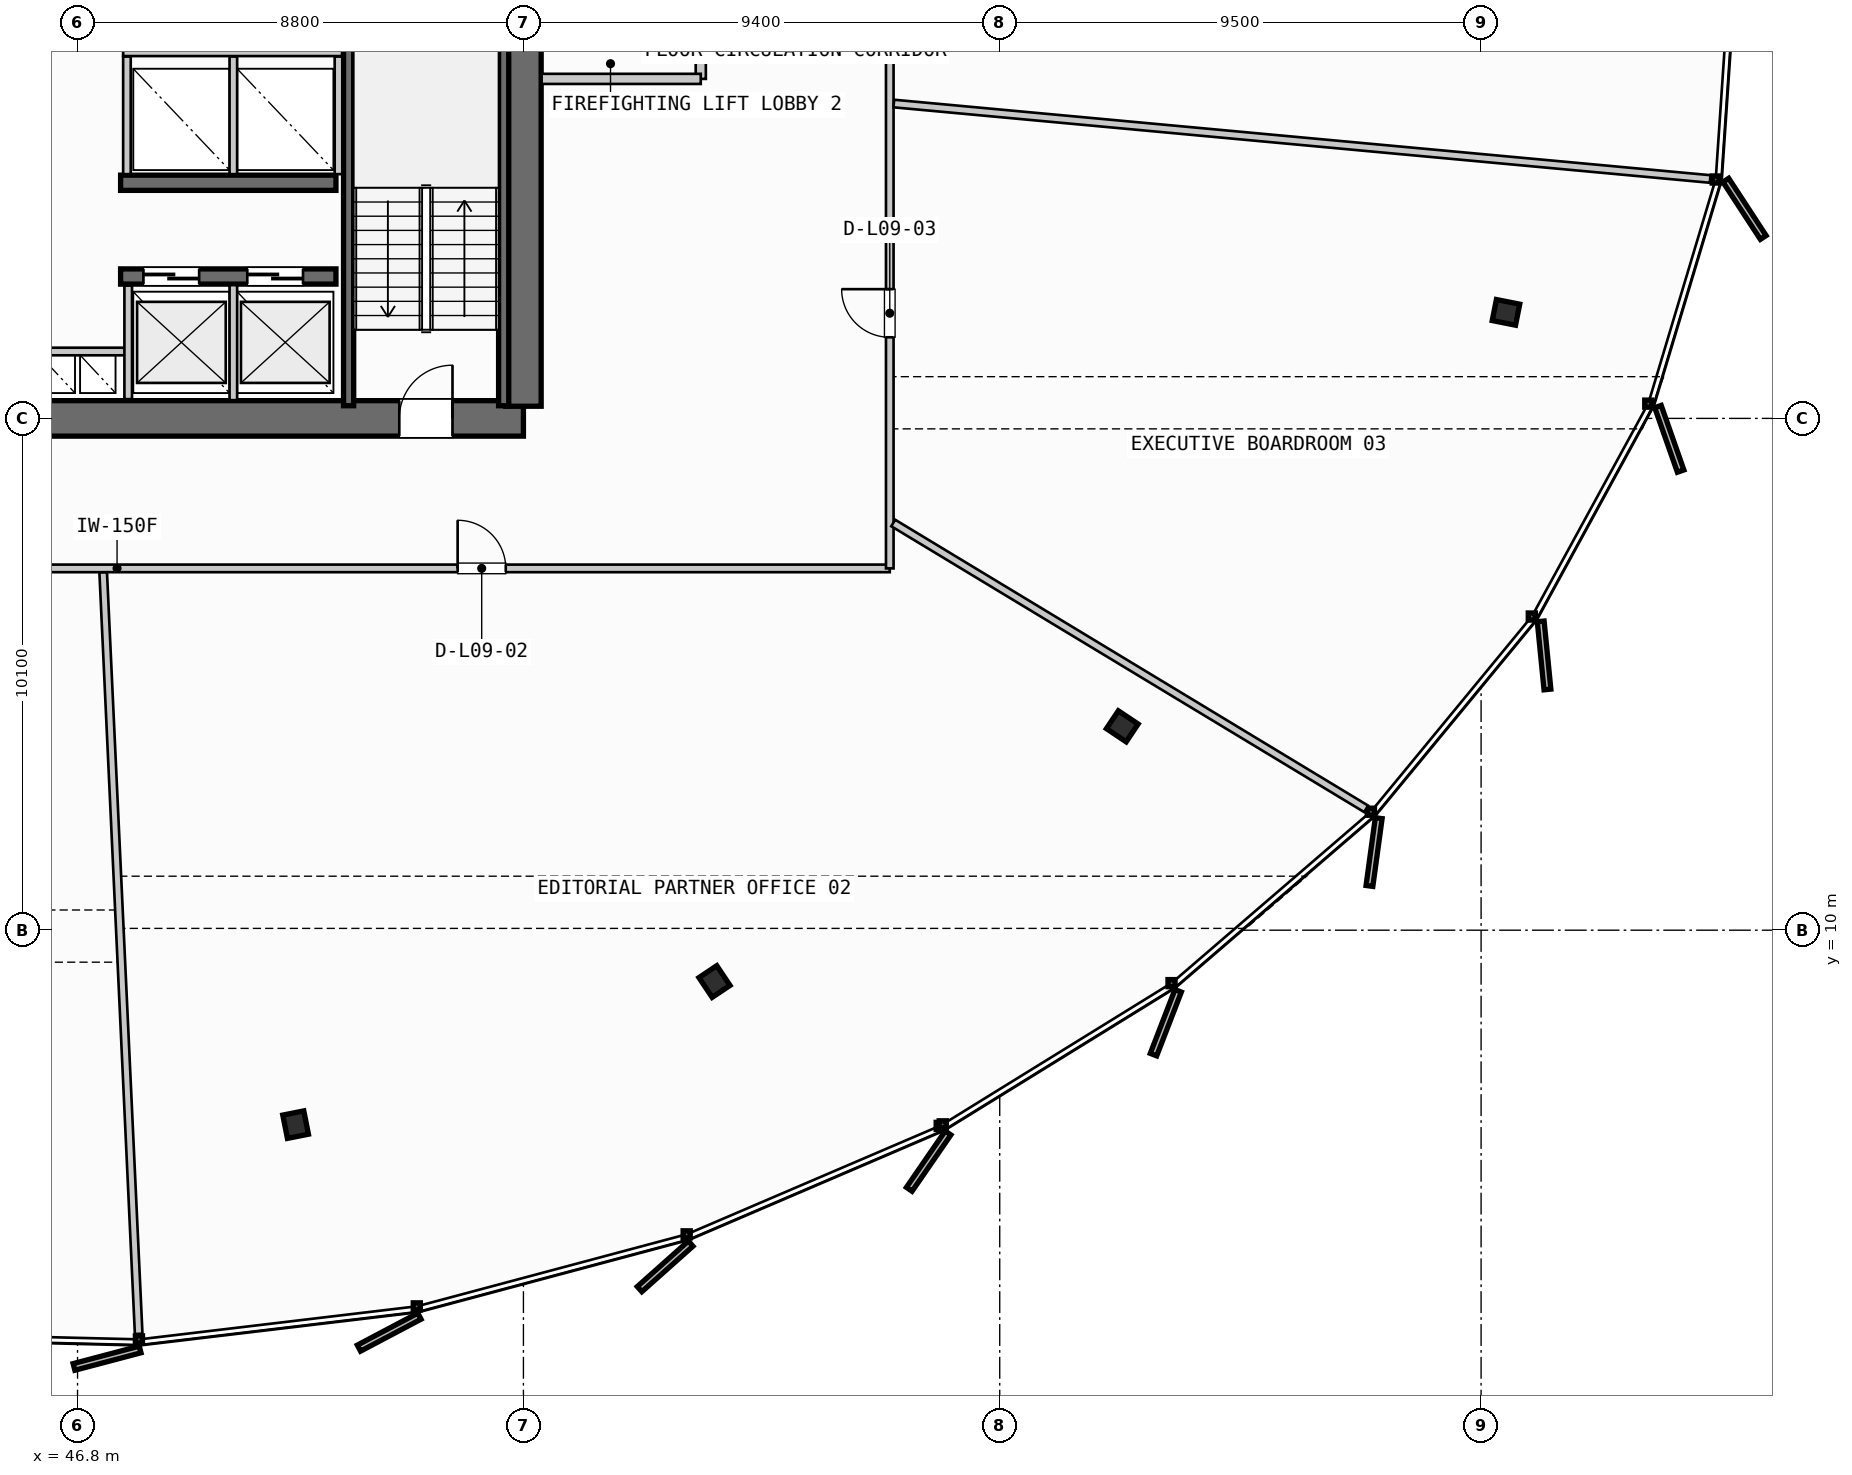
"""IFC4 building model, lengths in metres.
Left out: names, types, materials, properties, quantities, classifications, styles, units other than length and angle.
Written with IfcOpenShell. Run it as: python <this file> out.ifc"""

import sys

from ifc_helpers import new_model, si_unit, direction, frame, frame_2d, origin, origin_2d, place, context, subcontext, project, spatial, rectangle, i_section, extrude, source, transform, mapped, element, fill, save


model = new_model("IFC4")
c1 = context("Model", 3, precision=1e-05, world=origin(), true_north=direction((0.0, 1.0)))
c2 = subcontext(c1, "Body", "Model", "MODEL_VIEW")
j1 = project(units=[si_unit("LENGTHUNIT", "METRE"), si_unit("PLANEANGLEUNIT", "RADIAN")], contexts=[c1])
p1 = place(None, origin())
s1 = spatial("IfcSite", under=j1, at=p1, CompositionType="ELEMENT")
p2 = place(p1, origin())
s2 = spatial("IfcBuilding", under=s1, at=p2, CompositionType="ELEMENT")
p3 = place(p2, frame((0.0, 0.0, 41.0)))
s3 = spatial("IfcBuildingStorey", under=s2, at=p3, CompositionType="ELEMENT", Elevation=41.0)
p4 = place(p3, frame((38.0, 20.1, 0.0), z_axis=(0.0, 0.0, 1.0), x_axis=(1.0, 0.0, 0.0)))
e1 = element("IfcWall", 1, at=p4, inside=s3, PredefinedType="SHEAR", context=c2, shape_type="SweptSolid", body=[
    extrude(rectangle(XDim=17.6, YDim=0.7, at=frame_2d((8.8, 0.0))), origin(), (0.0, 0.0, 1.0), 3.55),
])
p5 = place(p4, frame((1.4, 0.0, 0.0)))
e2 = element("IfcOpeningElement", 2, at=p5, cuts=e1, PredefinedType="OPENING", context=c2, shape_type="SweptSolid", body=[
    extrude(rectangle(XDim=1.05, YDim=2.15, at=frame_2d((0.525, 1.075))), frame((0.0, 0.36, 0.0), z_axis=(0.0, -1.0, 0.0), x_axis=(1.0, 0.0, 0.0)), (0.0, 0.0, 1.0), 0.72),
])
p6 = place(p4, frame((15.15, 0.0, 0.0)))
e3 = element("IfcOpeningElement", 3, at=p6, cuts=e1, PredefinedType="OPENING", context=c2, shape_type="SweptSolid", body=[
    extrude(rectangle(XDim=1.05, YDim=2.15, at=frame_2d((0.525, 1.075))), frame((0.0, 0.36, 0.0), z_axis=(0.0, -1.0, 0.0), x_axis=(1.0, 0.0, 0.0)), (0.0, 0.0, 1.0), 0.72),
])
p7 = place(p3, frame((55.6, 20.34, 0.0), z_axis=(0.0, 0.0, 1.0), x_axis=(0.0, 1.0, 0.0)))
e4 = element("IfcWall", 4, at=p7, inside=s3, PredefinedType="SHEAR", context=c2, shape_type="SweptSolid", body=[
    extrude(rectangle(XDim=14.92, YDim=0.7, at=frame_2d((7.46, 0.0))), origin(), (0.0, 0.0, 1.0), 3.55),
])
p8 = place(p7, frame((12.71, 0.0, 0.0)))
e5 = element("IfcOpeningElement", 5, at=p8, cuts=e4, PredefinedType="OPENING", context=c2, shape_type="SweptSolid", body=[
    extrude(rectangle(XDim=1.05, YDim=2.15, at=frame_2d((0.525, 1.075))), frame((0.0, 0.36, 0.0), z_axis=(0.0, -1.0, 0.0), x_axis=(1.0, 0.0, 0.0)), (0.0, 0.0, 1.0), 0.72),
])
p9 = place(p7, frame((8.61, 0.0, 0.0)))
e6 = element("IfcOpeningElement", 6, at=p9, cuts=e4, PredefinedType="OPENING", context=c2, shape_type="SweptSolid", body=[
    extrude(rectangle(XDim=1.1, YDim=2.2, at=frame_2d((0.55, 1.1))), frame((0.0, 0.36, 0.0), z_axis=(0.0, -1.0, 0.0), x_axis=(1.0, 0.0, 0.0)), (0.0, 0.0, 1.0), 0.72),
])
p10 = place(p3, frame((47.65, 22.9, 0.0), z_axis=(0.0, 0.0, 1.0), x_axis=(1.0, 0.0, 0.0)))
e7 = element("IfcWall", 7, at=p10, inside=s3, PredefinedType="SHEAR", context=c2, shape_type="SweptSolid", body=[
    extrude(rectangle(XDim=4.25, YDim=0.3, at=frame_2d((2.125, 0.0))), origin(), (0.0, 0.0, 1.0), 3.55),
])
p11 = place(p10, frame((0.45, 0.0, 0.0)))
e8 = element("IfcOpeningElement", 8, at=p11, cuts=e7, PredefinedType="OPENING", context=c2, shape_type="SweptSolid", body=[
    extrude(rectangle(XDim=1.1, YDim=2.2, at=frame_2d((0.55, 1.1))), frame((0.0, 0.16, 0.0), z_axis=(0.0, -1.0, 0.0), x_axis=(1.0, 0.0, 0.0)), (0.0, 0.0, 1.0), 0.32),
])
p12 = place(p10, frame((2.5, 0.0, 0.0)))
e9 = element("IfcOpeningElement", 9, at=p12, cuts=e7, PredefinedType="OPENING", context=c2, shape_type="SweptSolid", body=[
    extrude(rectangle(XDim=1.1, YDim=2.2, at=frame_2d((0.55, 1.1))), frame((0.0, 0.16, 0.0), z_axis=(0.0, -1.0, 0.0), x_axis=(1.0, 0.0, 0.0)), (0.0, 0.0, 1.0), 0.32),
])
p13 = place(p3, frame((47.65, 24.75, 0.0), z_axis=(0.0, 0.0, 1.0), x_axis=(1.0, 0.0, 0.0)))
e10 = element("IfcWall", 10, at=p13, inside=s3, PredefinedType="SHEAR", context=c2, shape_type="SweptSolid", body=[
    extrude(rectangle(XDim=4.25, YDim=0.3, at=frame_2d((2.125, 0.0))), origin(), (0.0, 0.0, 1.0), 3.55),
])
m1 = source(origin(), c2, "Body", "SweptSolid", [
    extrude(i_section(OverallWidth=0.423, OverallDepth=0.469, WebThickness=0.051, FlangeThickness=0.081, FilletRadius=0.015, at=origin_2d()), origin(), (0.0, 0.0, 1.0), 3.55),
])
for number, where, z_axis, x_axis in (
    (11, (51.104, 6.163, 0.0), (0.0, 0.0, 1.0), (0.195, -0.981, 0.0)),
    (12, (59.37, 8.987, 0.0), (0.0, 0.0, 1.0), (0.556, -0.831, 0.0)),
    (13, (67.418, 14.023, 0.0), (0.0, 0.0, 1.0), (0.831, -0.556, 0.0)),
    (14, (74.991, 22.192, 0.0), (0.0, 0.0, 1.0), (0.981, -0.195, 0.0)),
):
    element("IfcColumn", number, at=place(p3, frame(where, z_axis=z_axis, x_axis=x_axis)), inside=s3, PredefinedType="COLUMN", context=c2, shape_type="MappedRepresentation", body=[
        mapped(m1, transform((0.0, 0.0, 0.0), scale=1.0)),
    ])
for number, where, z_axis, x_axis in (
    (15, (55.21, 27.7, 0.0), (0.0, 0.0, 1.0), (0.0, -1.0, 0.0)),
    (16, (52.15, 20.35, 0.0), (0.0, 0.0, 1.0), (0.0, 1.0, 0.0)),
):
    element("IfcWall", number, at=place(p3, frame(where, z_axis=z_axis, x_axis=x_axis)), inside=s3, PredefinedType="SHEAR", context=c2, shape_type="SweptSolid", body=[
        extrude(rectangle(XDim=7.35, YDim=0.2, at=frame_2d((3.675, 0.0))), origin(), (0.0, 0.0, 1.0), 3.55),
    ])
p14 = place(p3, frame((45.8, 21.42, 0.0), z_axis=(0.0, 0.0, 1.0), x_axis=(1.0, 0.0, 0.0)))
e17 = element("IfcWall", 17, at=p14, inside=s3, PredefinedType="PARTITIONING", context=c2, shape_type="SweptSolid", body=[
    extrude(rectangle(XDim=2.0, YDim=0.15, at=frame_2d((1.0, 0.0))), origin(), (0.0, 0.0, 1.0), 2.785),
])
p15 = place(p3, frame((47.8, 20.48, 0.0), z_axis=(0.0, 0.0, 1.0), x_axis=(0.0, 1.0, 0.0)))
e18 = element("IfcWall", 18, at=p15, inside=s3, PredefinedType="PARTITIONING", context=c2, shape_type="SweptSolid", body=[
    extrude(rectangle(XDim=2.24, YDim=0.15, at=frame_2d((1.12, 0.0))), origin(), (0.0, 0.0, 1.0), 2.785),
])
p16 = place(p3, frame((59.1, 26.8, 0.0), z_axis=(0.0, 0.0, 1.0), x_axis=(0.0, 1.0, 0.0)))
e19 = element("IfcWall", 19, at=p16, inside=s3, PredefinedType="PARTITIONING", context=c2, shape_type="SweptSolid", body=[
    extrude(rectangle(XDim=4.4, YDim=0.2, at=frame_2d((2.2, 0.0))), origin(), (0.0, 0.0, 1.0), 2.785),
])
p17 = place(p16, frame((1.65, 0.0, 0.0)))
e20 = element("IfcOpeningElement", 20, at=p17, cuts=e19, PredefinedType="OPENING", context=c2, shape_type="SweptSolid", body=[
    extrude(rectangle(XDim=1.05, YDim=2.15, at=frame_2d((0.525, 1.075))), frame((0.0, 0.11, 0.0), z_axis=(0.0, -1.0, 0.0), x_axis=(1.0, 0.0, 0.0)), (0.0, 0.0, 1.0), 0.22),
])
p18 = place(p3, frame((55.96, 26.8, 0.0), z_axis=(0.0, 0.0, 1.0), x_axis=(1.0, 0.0, 0.0)))
e21 = element("IfcWall", 21, at=p18, inside=s3, PredefinedType="PARTITIONING", context=c2, shape_type="SweptSolid", body=[
    extrude(rectangle(XDim=3.14, YDim=0.2, at=frame_2d((1.57, 0.0))), origin(), (0.0, 0.0, 1.0), 2.785),
])
p19 = place(p3, frame((49.875, 20.46, 0.0), z_axis=(0.0, 0.0, 1.0), x_axis=(0.0, 1.0, 0.0)))
e22 = element("IfcWall", 22, at=p19, inside=s3, PredefinedType="PARTITIONING", context=c2, shape_type="SweptSolid", body=[
    extrude(rectangle(XDim=2.27, YDim=0.15, at=frame_2d((1.135, 0.0))), origin(), (0.0, 0.0, 1.0), 2.785),
])
p20 = place(p3, frame((47.7, 27.325, 0.0), z_axis=(0.0, 0.0, 1.0), x_axis=(1.0, 0.0, 0.0)))
e23 = element("IfcWall", 23, at=p20, inside=s3, PredefinedType="PARTITIONING", context=c2, shape_type="SweptSolid", body=[
    extrude(rectangle(XDim=4.32, YDim=0.15, at=frame_2d((2.16, 0.0))), origin(), (0.0, 0.0, 1.0), 2.785),
])
for number, where, z_axis, x_axis in (
    (24, (47.775, 24.92, 0.0), (0.0, 0.0, 1.0), (0.0, 1.0, 0.0)),
    (25, (49.875, 24.92, 0.0), (0.0, 0.0, 1.0), (0.0, 1.0, 0.0)),
    (26, (51.95, 24.92, 0.0), (0.0, 0.0, 1.0), (0.0, 1.0, 0.0)),
):
    element("IfcWall", number, at=place(p3, frame(where, z_axis=z_axis, x_axis=x_axis)), inside=s3, PredefinedType="PARTITIONING", context=c2, shape_type="SweptSolid", body=[
        extrude(rectangle(XDim=2.32, YDim=0.15, at=frame_2d((1.16, 0.0))), origin(), (0.0, 0.0, 1.0), 2.785),
    ])
p21 = place(p3, frame((32.33, 17.14, 0.0), z_axis=(0.0, 0.0, 1.0), x_axis=(1.0, 0.0, 0.0)))
e27 = element("IfcWall", 27, at=p21, inside=s3, PredefinedType="PARTITIONING", context=c2, shape_type="SweptSolid", body=[
    extrude(rectangle(XDim=30.5, YDim=0.15, at=frame_2d((15.25, 0.0))), origin(), (0.0, 0.0, 1.0), 2.785),
])
p22 = place(p21, frame((7.302, 0.0, 0.0)))
e28 = element("IfcOpeningElement", 28, at=p22, cuts=e27, PredefinedType="OPENING", context=c2, shape_type="SweptSolid", body=[
    extrude(rectangle(XDim=0.95, YDim=2.15, at=frame_2d((0.475, 1.075))), frame((0.0, 0.085, 0.0), z_axis=(0.0, -1.0, 0.0), x_axis=(1.0, 0.0, 0.0)), (0.0, 0.0, 1.0), 0.17),
])
p23 = place(p21, frame((21.971, 0.0, 0.0)))
e29 = element("IfcOpeningElement", 29, at=p23, cuts=e27, PredefinedType="OPENING", context=c2, shape_type="SweptSolid", body=[
    extrude(rectangle(XDim=0.95, YDim=2.15, at=frame_2d((0.475, 1.075))), frame((0.0, 0.085, 0.0), z_axis=(0.0, -1.0, 0.0), x_axis=(1.0, 0.0, 0.0)), (0.0, 0.0, 1.0), 0.17),
])
p24 = place(p3, frame((62.83, 17.14, 0.0), z_axis=(0.0, 0.0, 1.0), x_axis=(0.0, 1.0, 0.0)))
e30 = element("IfcWall", 30, at=p24, inside=s3, PredefinedType="PARTITIONING", context=c2, shape_type="SweptSolid", body=[
    extrude(rectangle(XDim=20.48, YDim=0.15, at=frame_2d((10.24, 0.0))), origin(), (0.0, 0.0, 1.0), 2.785),
])
p25 = place(p24, frame((4.56, 0.0, 0.0)))
e31 = element("IfcOpeningElement", 31, at=p25, cuts=e30, PredefinedType="OPENING", context=c2, shape_type="SweptSolid", body=[
    extrude(rectangle(XDim=0.95, YDim=2.15, at=frame_2d((0.475, 1.075))), frame((0.0, 0.085, 0.0), z_axis=(0.0, -1.0, 0.0), x_axis=(1.0, 0.0, 0.0)), (0.0, 0.0, 1.0), 0.17),
])
p26 = place(p24, frame((13.626, 0.0, 0.0)))
e32 = element("IfcOpeningElement", 32, at=p26, cuts=e30, PredefinedType="OPENING", context=c2, shape_type="SweptSolid", body=[
    extrude(rectangle(XDim=0.95, YDim=2.15, at=frame_2d((0.475, 1.075))), frame((0.0, 0.085, 0.0), z_axis=(0.0, -1.0, 0.0), x_axis=(1.0, 0.0, 0.0)), (0.0, 0.0, 1.0), 0.17),
])
p27 = place(p3, frame((47.306, 17.06, 0.0), z_axis=(0.0, 0.0, 1.0), x_axis=(0.046548778798, -0.998916018088, 0.0)))
e33 = element("IfcWall", 33, at=p27, inside=s3, PredefinedType="PARTITIONING", context=c2, shape_type="SweptSolid", body=[
    extrude(rectangle(XDim=15.042, YDim=0.15, at=frame_2d((7.521, 0.0))), origin(), (0.0, 0.0, 1.0), 2.785),
])
p28 = place(p3, frame((62.898, 18.036, 0.0), z_axis=(0.0, 0.0, 1.0), x_axis=(0.855815194925, -0.517281695148, 0.0)))
e34 = element("IfcWall", 34, at=p28, inside=s3, PredefinedType="PARTITIONING", context=c2, shape_type="SweptSolid", body=[
    extrude(rectangle(XDim=10.905, YDim=0.15, at=frame_2d((5.452, 0.0))), origin(), (0.0, 0.0, 1.0), 2.785),
])
p29 = place(p3, frame((62.91, 26.314, 0.0), z_axis=(0.0, 0.0, 1.0), x_axis=(0.995756410418, -0.092028099575, 0.0)))
e35 = element("IfcWall", 35, at=p29, inside=s3, PredefinedType="PARTITIONING", context=c2, shape_type="SweptSolid", body=[
    extrude(rectangle(XDim=16.18, YDim=0.15, at=frame_2d((8.09, 0.0))), origin(), (0.0, 0.0, 1.0), 2.785),
])
m2 = source(origin(), c2, "Body", "SweptSolid", [
    extrude(rectangle(XDim=1.05, YDim=2.15, at=frame_2d((0.525, 1.075))), frame((0.0, 0.025, 0.0), z_axis=(0.0, -1.0, 0.0), x_axis=(1.0, 0.0, 0.0)), (0.0, 0.0, 1.0), 0.05),
])
p30 = place(p6, origin())
e36 = element("IfcDoor", 36, at=p30, inside=s3, OperationType="SINGLE_SWING_RIGHT", PredefinedType="DOOR", context=c2, shape_type="MappedRepresentation", body=[
    mapped(m2, transform((0.0, 0.0, 0.0), scale=1.0)),
])
fill(e3, e36)
m3 = source(origin(), c2, "Body", "SweptSolid", [
    extrude(rectangle(XDim=1.1, YDim=2.2, at=frame_2d((0.55, 1.1))), frame((0.0, 0.025, 0.0), z_axis=(0.0, -1.0, 0.0), x_axis=(1.0, 0.0, 0.0)), (0.0, 0.0, 1.0), 0.05),
])
p31 = place(p11, origin())
e37 = element("IfcDoor", 37, at=p31, inside=s3, OperationType="SLIDING_TO_LEFT", PredefinedType="DOOR", context=c2, shape_type="MappedRepresentation", body=[
    mapped(m3, transform((0.0, 0.0, 0.0), scale=1.0)),
])
fill(e8, e37)
p32 = place(p12, origin())
e38 = element("IfcDoor", 38, at=p32, inside=s3, OperationType="SLIDING_TO_LEFT", PredefinedType="DOOR", context=c2, shape_type="MappedRepresentation", body=[
    mapped(m3, transform((0.0, 0.0, 0.0), scale=1.0)),
])
fill(e9, e38)
m4 = source(origin(), c2, "Body", "SweptSolid", [
    extrude(rectangle(XDim=0.95, YDim=2.15, at=frame_2d((0.475, 1.075))), frame((0.0, 0.025, 0.0), z_axis=(0.0, -1.0, 0.0), x_axis=(1.0, 0.0, 0.0)), (0.0, 0.0, 1.0), 0.05),
])
p33 = place(p23, origin())
e39 = element("IfcDoor", 39, at=p33, inside=s3, OperationType="SINGLE_SWING_LEFT", PredefinedType="DOOR", context=c2, shape_type="MappedRepresentation", body=[
    mapped(m4, transform((0.0, 0.0, 0.0), scale=1.0)),
])
fill(e29, e39)
p34 = place(p25, origin())
e40 = element("IfcDoor", 40, at=p34, inside=s3, OperationType="SINGLE_SWING_RIGHT", PredefinedType="DOOR", context=c2, shape_type="MappedRepresentation", body=[
    mapped(m4, transform((0.0, 0.0, 0.0), scale=1.0)),
])
fill(e31, e40)
save(model, sys.argv[1])
